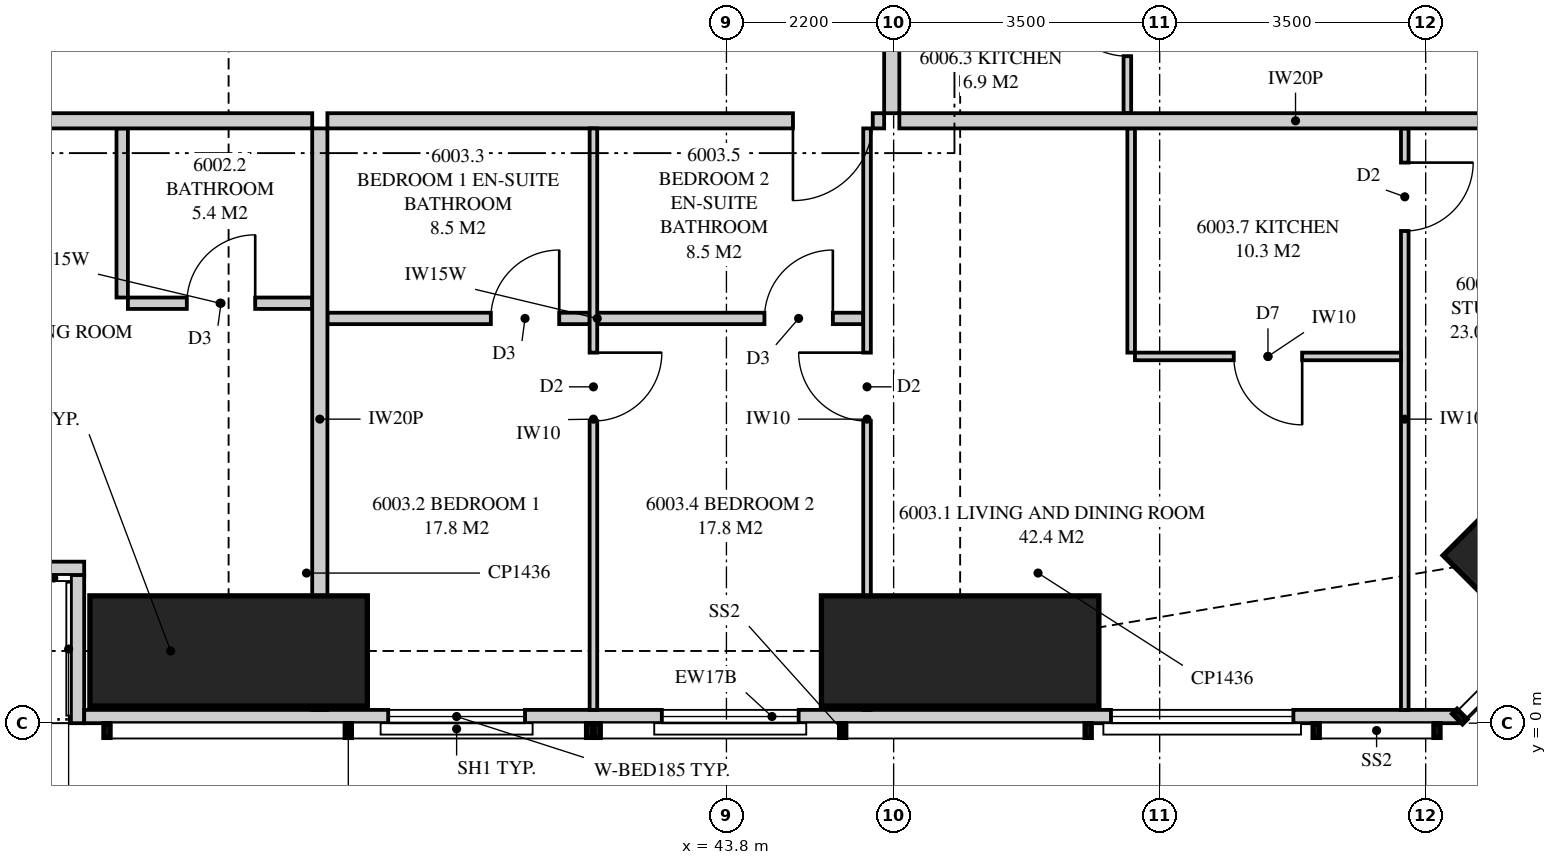
"""IFC4 building model, lengths in metres.
Left out: names, types, materials, properties, quantities, classifications, styles, units other than length and angle.
Written with IfcOpenShell. Run it as: python <this file> out.ifc"""

import sys

from ifc_helpers import new_model, si_unit, direction, frame, frame_2d, origin, origin_2d, place, context, subcontext, project, spatial, polyline, rectangle, hollow_rectangle, outline, extrude, element, fill, save


model = new_model("IFC4")
c1 = context("Model", 3, precision=1e-05, world=origin(), true_north=direction((0.0, 1.0)))
c2 = subcontext(c1, "Body", "Model", "MODEL_VIEW")
j1 = project(units=[si_unit("LENGTHUNIT", "METRE"), si_unit("PLANEANGLEUNIT", "RADIAN")], contexts=[c1])
p1 = place(None, origin())
s1 = spatial("IfcSite", under=j1, at=p1, CompositionType="ELEMENT")
p2 = place(p1, origin())
s2 = spatial("IfcBuilding", under=s1, at=p2, CompositionType="ELEMENT")
p3 = place(p2, frame((0.0, 0.0, 221.45)))
s3 = spatial("IfcBuildingStorey", under=s2, at=p3, CompositionType="ELEMENT", Elevation=221.45)
for number, where, z_axis, x_axis in (
    (1, (37.25, 0.95, 0.0), (0.0, 0.0, 1.0), (0.0, 1.0, 0.0)),
    (2, (46.875, 0.95, 0.0), (0.0, 0.0, 1.0), (0.0, 1.0, 0.0)),
):
    element("IfcColumn", number, at=place(p3, frame(where, z_axis=z_axis, x_axis=x_axis)), inside=s3, PredefinedType="COLUMN", context=c2, shape_type="SweptSolid", body=[
        extrude(rectangle(XDim=1.45, YDim=3.65, at=origin_2d()), origin(), (0.0, 0.0, 1.0), 3.5),
    ])
p4 = place(p3, frame((54.293, 2.207, 0.0), z_axis=(0.0, 0.0, 1.0), x_axis=(-0.707106781187, 0.707106781187, 0.0)))
e3 = element("IfcColumn", 3, at=p4, inside=s3, PredefinedType="COLUMN", context=c2, shape_type="SweptSolid", body=[
    extrude(hollow_rectangle(XDim=1.5, YDim=1.5, WallThickness=0.125, at=origin_2d()), origin(), (0.0, 0.0, 1.0), 3.5),
])
p5 = place(p3, frame((35.35, 0.087, 0.0), z_axis=(0.0, 0.0, 1.0), x_axis=(1.0, 0.0, 0.0)))
e4 = element("IfcWall", 4, at=p5, inside=s3, PredefinedType="SOLIDWALL", context=c2, shape_type="SweptSolid", body=[
    extrude(outline(polyline([(0.0, 0.0), (18.099, 0.0), (18.099, 3.26), (11.74, 3.26), (11.74, 2.3), (11.656, 2.3), (11.656, 3.26), (11.525, 3.26), (11.525, 2.3), (0.0, 2.3), (0.0, 0.0)])), frame((0.0, 0.087, 0.0), z_axis=(0.0, -1.0, 0.0), x_axis=(1.0, 0.0, 0.0)), (0.0, 0.0, 1.0), 0.175),
])
p6 = place(p5, frame((4.0, 0.0, 0.4)))
e5 = element("IfcOpeningElement", 5, at=p6, cuts=e4, PredefinedType="OPENING", context=c2, shape_type="SweptSolid", body=[
    extrude(rectangle(XDim=1.8, YDim=1.85, at=frame_2d((0.9, 0.925))), frame((0.0, 0.097, 0.0), z_axis=(0.0, -1.0, 0.0), x_axis=(1.0, 0.0, 0.0)), (0.0, 0.0, 1.0), 0.195),
])
p7 = place(p5, frame((7.6, 0.0, 0.4)))
e6 = element("IfcOpeningElement", 6, at=p7, cuts=e4, PredefinedType="OPENING", context=c2, shape_type="SweptSolid", body=[
    extrude(rectangle(XDim=1.8, YDim=1.85, at=frame_2d((0.9, 0.925))), frame((0.0, 0.097, 0.0), z_axis=(0.0, -1.0, 0.0), x_axis=(1.0, 0.0, 0.0)), (0.0, 0.0, 1.0), 0.195),
])
p8 = place(p5, frame((13.51, 0.0, 0.4)))
e7 = element("IfcOpeningElement", 7, at=p8, cuts=e4, PredefinedType="OPENING", context=c2, shape_type="SweptSolid", body=[
    extrude(rectangle(XDim=2.4, YDim=1.85, at=frame_2d((1.2, 0.925))), frame((0.0, 0.097, 0.0), z_axis=(0.0, -1.0, 0.0), x_axis=(1.0, 0.0, 0.0)), (0.0, 0.0, 1.0), 0.195),
])
p9 = place(p3, frame((32.3, 2.038, 0.0), z_axis=(0.0, 0.0, 1.0), x_axis=(1.0, 0.0, 0.0)))
e8 = element("IfcWall", 8, at=p9, inside=s3, PredefinedType="SOLIDWALL", context=c2, shape_type="SweptSolid", body=[
    extrude(rectangle(XDim=3.05, YDim=0.175, at=frame_2d((1.525, 0.0))), origin(), (0.0, 0.0, 1.0), 3.26),
])
p10 = place(p9, frame((0.625, 0.0, 0.0)))
e9 = element("IfcOpeningElement", 9, at=p10, cuts=e8, PredefinedType="OPENING", context=c2, shape_type="SweptSolid", body=[
    extrude(rectangle(XDim=1.8, YDim=2.25, at=frame_2d((0.9, 1.125))), frame((0.0, 0.097, 0.0), z_axis=(0.0, -1.0, 0.0), x_axis=(1.0, 0.0, 0.0)), (0.0, 0.0, 1.0), 0.195),
])
p11 = place(p3, frame((35.262, 0.0, 0.0), z_axis=(0.0, 0.0, 1.0), x_axis=(0.0, 1.0, 0.0)))
e10 = element("IfcWall", 10, at=p11, inside=s3, PredefinedType="SOLIDWALL", context=c2, shape_type="SweptSolid", body=[
    extrude(outline(polyline([(0.0, 0.0), (1.95, 0.0), (1.95, 3.26), (1.75, 3.26), (1.75, 2.3), (0.15, 2.3), (0.15, 3.26), (0.0, 3.26), (0.0, 0.0)])), frame((0.0, 0.087, 0.0), z_axis=(0.0, -1.0, 0.0), x_axis=(1.0, 0.0, 0.0)), (0.0, 0.0, 1.0), 0.175),
])
p12 = place(p3, frame((38.45, 0.175, 0.0), z_axis=(0.0, 0.0, 1.0), x_axis=(0.0, 1.0, 0.0)))
e11 = element("IfcWall", 11, at=p12, inside=s3, PredefinedType="PARTITIONING", context=c2, shape_type="SweptSolid", body=[
    extrude(outline(polyline([(0.529, 2.3), (0.0, 2.3), (0.0, 0.0), (0.529, 0.0), (0.529, 0.338), (1.021, 0.338), (1.021, 0.0), (7.65, 0.0), (7.65, 2.66), (1.685, 2.66), (1.685, 2.3), (1.021, 2.3), (1.021, 1.962), (0.529, 1.962), (0.529, 2.3)])), frame((0.0, 0.1, 0.0), z_axis=(0.0, -1.0, 0.0), x_axis=(1.0, 0.0, 0.0)), (0.0, 0.0, 1.0), 0.2),
])
p13 = place(p3, frame((26.5, 7.925, 0.0), z_axis=(0.0, 0.0, 1.0), x_axis=(1.0, 0.0, 0.0)))
e12 = element("IfcWall", 12, at=p13, inside=s3, PredefinedType="PARTITIONING", context=c2, shape_type="SweptSolid", body=[
    extrude(outline(polyline([(0.0, 0.0), (11.85, 0.0), (11.85, 3.26), (11.85, 2.66), (9.44, 2.66), (9.44, 3.26), (2.435, 3.26), (2.435, 2.66), (0.0, 2.66), (0.0, 3.26), (0.0, 0.0)])), frame((0.0, 0.1, 0.0), z_axis=(0.0, -1.0, 0.0), x_axis=(1.0, 0.0, 0.0)), (0.0, 0.0, 1.0), 0.2),
])
p14 = place(p13, frame((5.425, 0.0, 0.0)))
e13 = element("IfcOpeningElement", 13, at=p14, cuts=e12, PredefinedType="OPENING", context=c2, shape_type="SweptSolid", body=[
    extrude(rectangle(XDim=1.05, YDim=2.2, at=frame_2d((0.525, 1.1))), frame((0.0, 0.11, 0.0), z_axis=(0.0, -1.0, 0.0), x_axis=(1.0, 0.0, 0.0)), (0.0, 0.0, 1.0), 0.22),
])
p15 = place(p3, frame((35.925, 5.525, 0.0), z_axis=(0.0, 0.0, 1.0), x_axis=(1.0, 0.0, 0.0)))
e14 = element("IfcWall", 14, at=p15, inside=s3, PredefinedType="PLUMBINGWALL", context=c2, shape_type="SweptSolid", body=[
    extrude(outline(polyline([(0.0, 0.0), (2.425, 0.0), (2.425, 3.26), (2.425, 2.66), (0.04, 2.66), (0.04, 3.26), (0.0, 3.26), (0.0, 0.0)])), frame((0.0, 0.075, 0.0), z_axis=(0.0, -1.0, 0.0), x_axis=(1.0, 0.0, 0.0)), (0.0, 0.0, 1.0), 0.15),
])
p16 = place(p15, frame((0.775, 0.0, 0.0)))
e15 = element("IfcOpeningElement", 15, at=p16, cuts=e14, PredefinedType="OPENING", context=c2, shape_type="SweptSolid", body=[
    extrude(rectangle(XDim=0.9, YDim=2.1, at=frame_2d((0.45, 1.05))), frame((0.0, 0.085, 0.0), z_axis=(0.0, -1.0, 0.0), x_axis=(1.0, 0.0, 0.0)), (0.0, 0.0, 1.0), 0.17),
])
p17 = place(p3, frame((35.85, 5.6, 0.0), z_axis=(0.0, 0.0, 1.0), x_axis=(0.0, 1.0, 0.0)))
e16 = element("IfcWall", 16, at=p17, inside=s3, PredefinedType="PLUMBINGWALL", context=c2, shape_type="SweptSolid", body=[
    extrude(rectangle(XDim=2.225, YDim=0.15, at=frame_2d((1.112, 0.0))), origin(), (0.0, 0.0, 1.0), 3.26),
])
p18 = place(p3, frame((38.55, 7.925, 0.0), z_axis=(0.0, 0.0, 1.0), x_axis=(1.0, 0.0, 0.0)))
e17 = element("IfcWall", 17, at=p18, inside=s3, PredefinedType="PARTITIONING", context=c2, shape_type="SweptSolid", body=[
    extrude(outline(polyline([(0.0, 0.0), (7.325, 0.0), (7.325, 3.26), (7.325, 2.66), (7.015, 2.66), (7.015, 3.26), (0.01, 3.26), (0.01, 2.66), (0.0, 2.66), (0.0, 3.26), (0.0, 0.0)])), frame((0.0, 0.1, 0.0), z_axis=(0.0, -1.0, 0.0), x_axis=(1.0, 0.0, 0.0)), (0.0, 0.0, 1.0), 0.2),
])
p19 = place(p18, frame((6.125, 0.0, 0.0)))
e18 = element("IfcOpeningElement", 18, at=p19, cuts=e17, PredefinedType="OPENING", context=c2, shape_type="SweptSolid", body=[
    extrude(rectangle(XDim=1.05, YDim=2.2, at=frame_2d((0.525, 1.1))), frame((0.0, 0.11, 0.0), z_axis=(0.0, -1.0, 0.0), x_axis=(1.0, 0.0, 0.0)), (0.0, 0.0, 1.0), 0.22),
])
p20 = place(p3, frame((42.05, 0.175, 0.0), z_axis=(0.0, 0.0, 1.0), x_axis=(0.0, 1.0, 0.0)))
e19 = element("IfcWall", 19, at=p20, inside=s3, PredefinedType="PARTITIONING", context=c2, shape_type="SweptSolid", body=[
    extrude(outline(polyline([(0.0, 0.0), (7.65, 0.0), (7.65, 3.26), (1.635, 3.26), (1.635, 2.3), (0.0, 2.3), (0.0, 3.26), (0.0, 0.0)])), frame((0.0, 0.05, 0.0), z_axis=(0.0, -1.0, 0.0), x_axis=(1.0, 0.0, 0.0)), (0.0, 0.0, 1.0), 0.1),
])
p21 = place(p20, frame((3.8, 0.0, 0.0)))
e20 = element("IfcOpeningElement", 20, at=p21, cuts=e19, PredefinedType="OPENING", context=c2, shape_type="SweptSolid", body=[
    extrude(rectangle(XDim=0.9, YDim=2.1, at=frame_2d((0.45, 1.05))), frame((0.0, 0.06, 0.0), z_axis=(0.0, -1.0, 0.0), x_axis=(1.0, 0.0, 0.0)), (0.0, 0.0, 1.0), 0.12),
])
p22 = place(p3, frame((45.65, 0.175, 0.0), z_axis=(0.0, 0.0, 1.0), x_axis=(0.0, 1.0, 0.0)))
e21 = element("IfcWall", 21, at=p22, inside=s3, PredefinedType="PARTITIONING", context=c2, shape_type="SweptSolid", body=[
    extrude(outline(polyline([(0.529, 2.3), (0.0, 2.3), (0.0, 0.0), (0.529, 0.0), (0.529, 0.252), (1.021, 0.252), (1.021, 0.0), (7.65, 0.0), (7.65, 2.66), (1.635, 2.66), (1.635, 2.3), (1.021, 2.3), (1.021, 2.048), (0.529, 2.048), (0.529, 2.3)])), frame((0.0, 0.05, 0.0), z_axis=(0.0, -1.0, 0.0), x_axis=(1.0, 0.0, 0.0)), (0.0, 0.0, 1.0), 0.1),
])
p23 = place(p22, frame((3.8, 0.0, 0.0)))
e22 = element("IfcOpeningElement", 22, at=p23, cuts=e21, PredefinedType="OPENING", context=c2, shape_type="SweptSolid", body=[
    extrude(rectangle(XDim=0.9, YDim=2.1, at=frame_2d((0.45, 1.05))), frame((0.0, 0.06, 0.0), z_axis=(0.0, -1.0, 0.0), x_axis=(1.0, 0.0, 0.0)), (0.0, 0.0, 1.0), 0.12),
])
p24 = place(p3, frame((38.55, 5.325, 0.0), z_axis=(0.0, 0.0, 1.0), x_axis=(1.0, 0.0, 0.0)))
e23 = element("IfcWall", 23, at=p24, inside=s3, PredefinedType="PLUMBINGWALL", context=c2, shape_type="SweptSolid", body=[
    extrude(rectangle(XDim=3.45, YDim=0.15, at=frame_2d((1.725, 0.0))), origin(), (0.0, 0.0, 1.0), 3.26),
])
p25 = place(p24, frame((2.15, 0.0, 0.0)))
e24 = element("IfcOpeningElement", 24, at=p25, cuts=e23, PredefinedType="OPENING", context=c2, shape_type="SweptSolid", body=[
    extrude(rectangle(XDim=0.9, YDim=2.1, at=frame_2d((0.45, 1.05))), frame((0.0, 0.085, 0.0), z_axis=(0.0, -1.0, 0.0), x_axis=(1.0, 0.0, 0.0)), (0.0, 0.0, 1.0), 0.17),
])
p26 = place(p3, frame((42.1, 5.325, 0.0), z_axis=(0.0, 0.0, 1.0), x_axis=(1.0, 0.0, 0.0)))
e25 = element("IfcWall", 25, at=p26, inside=s3, PredefinedType="PLUMBINGWALL", context=c2, shape_type="SweptSolid", body=[
    extrude(outline(polyline([(0.0, 0.0), (3.5, 0.0), (3.5, 3.26), (3.5, 2.66), (3.49, 2.66), (3.49, 3.26), (0.0, 3.26), (0.0, 0.0)])), frame((0.0, 0.075, 0.0), z_axis=(0.0, -1.0, 0.0), x_axis=(1.0, 0.0, 0.0)), (0.0, 0.0, 1.0), 0.15),
])
p27 = place(p26, frame((2.2, 0.0, 0.0)))
e26 = element("IfcOpeningElement", 26, at=p27, cuts=e25, PredefinedType="OPENING", context=c2, shape_type="SweptSolid", body=[
    extrude(rectangle(XDim=0.9, YDim=2.1, at=frame_2d((0.45, 1.05))), frame((0.0, 0.085, 0.0), z_axis=(0.0, -1.0, 0.0), x_axis=(1.0, 0.0, 0.0)), (0.0, 0.0, 1.0), 0.17),
])
p28 = place(p3, frame((52.725, 0.175, 0.0), z_axis=(0.0, 0.0, 1.0), x_axis=(0.0, 1.0, 0.0)))
e27 = element("IfcWall", 27, at=p28, inside=s3, PredefinedType="PARTITIONING", context=c2, shape_type="SweptSolid", body=[
    extrude(outline(polyline([(0.0, 0.0), (7.65, 0.0), (7.65, 3.26), (2.639, 3.26), (2.639, 2.3), (0.894, 2.3), (0.894, 3.26), (0.0, 3.26), (0.0, 0.0)])), frame((0.0, 0.05, 0.0), z_axis=(0.0, -1.0, 0.0), x_axis=(1.0, 0.0, 0.0)), (0.0, 0.0, 1.0), 0.1),
])
p29 = place(p28, frame((6.3, 0.0, 0.0)))
e28 = element("IfcOpeningElement", 28, at=p29, cuts=e27, PredefinedType="OPENING", context=c2, shape_type="SweptSolid", body=[
    extrude(rectangle(XDim=0.9, YDim=2.1, at=frame_2d((0.45, 1.05))), frame((0.0, 0.06, 0.0), z_axis=(0.0, -1.0, 0.0), x_axis=(1.0, 0.0, 0.0)), (0.0, 0.0, 1.0), 0.12),
])
p30 = place(p3, frame((49.175, 4.825, 0.0), z_axis=(0.0, 0.0, 1.0), x_axis=(1.0, 0.0, 0.0)))
e29 = element("IfcWall", 29, at=p30, inside=s3, PredefinedType="PARTITIONING", context=c2, shape_type="SweptSolid", body=[
    extrude(rectangle(XDim=3.5, YDim=0.1, at=frame_2d((1.75, 0.0))), origin(), (0.0, 0.0, 1.0), 3.26),
])
p31 = place(p30, frame((1.3, 0.0, 0.0)))
e30 = element("IfcOpeningElement", 30, at=p31, cuts=e29, PredefinedType="OPENING", context=c2, shape_type="SweptSolid", body=[
    extrude(rectangle(XDim=0.9, YDim=2.1, at=frame_2d((0.45, 1.05))), frame((0.0, 0.06, 0.0), z_axis=(0.0, -1.0, 0.0), x_axis=(1.0, 0.0, 0.0)), (0.0, 0.0, 1.0), 0.12),
])
p32 = place(p3, frame((49.125, 4.875, 0.0), z_axis=(0.0, 0.0, 1.0), x_axis=(0.0, 1.0, 0.0)))
e31 = element("IfcWall", 31, at=p32, inside=s3, PredefinedType="PARTITIONING", context=c2, shape_type="SweptSolid", body=[
    extrude(rectangle(XDim=2.95, YDim=0.1, at=frame_2d((1.475, 0.0))), origin(), (0.0, 0.0, 1.0), 3.26),
])
p33 = place(p3, frame((46.075, 7.925, 0.0), z_axis=(0.0, 0.0, 1.0), x_axis=(1.0, 0.0, 0.0)))
e32 = element("IfcWall", 32, at=p33, inside=s3, PredefinedType="PARTITIONING", context=c2, shape_type="SweptSolid", body=[
    extrude(outline(polyline([(0.0, 0.0), (10.425, 0.0), (10.425, 3.26), (9.8, 3.26), (9.8, 2.3), (7.968, 2.3), (7.968, 3.26), (2.11, 3.26), (2.11, 2.66), (0.0, 2.66), (0.0, 3.26), (0.0, 0.0)])), frame((0.0, 0.1, 0.0), z_axis=(0.0, -1.0, 0.0), x_axis=(1.0, 0.0, 0.0)), (0.0, 0.0, 1.0), 0.2),
])
p34 = place(p3, frame((45.975, 8.025, 0.0), z_axis=(0.0, 0.0, 1.0), x_axis=(0.0, 1.0, 0.0)))
e33 = element("IfcWall", 33, at=p34, inside=s3, PredefinedType="PARTITIONING", context=c2, shape_type="SweptSolid", body=[
    extrude(outline(polyline([(0.0, 0.0), (6.025, 0.0), (6.025, 3.26), (6.025, 2.66), (5.085, 2.66), (0.0, 2.66), (0.0, 3.26), (0.0, 0.0)])), frame((0.0, 0.1, 0.0), z_axis=(0.0, -1.0, 0.0), x_axis=(1.0, 0.0, 0.0)), (0.0, 0.0, 1.0), 0.2),
])
p35 = place(p34, frame((2.512, 0.0, 0.0)))
e34 = element("IfcOpeningElement", 34, at=p35, cuts=e33, PredefinedType="OPENING", context=c2, shape_type="SweptSolid", body=[
    extrude(rectangle(XDim=1.05, YDim=2.2, at=frame_2d((0.525, 1.1))), frame((0.0, 0.11, 0.0), z_axis=(0.0, -1.0, 0.0), x_axis=(1.0, 0.0, 0.0)), (0.0, 0.0, 1.0), 0.22),
])
p36 = place(p3, frame((49.075, 8.025, 0.0), z_axis=(0.0, 0.0, 1.0), x_axis=(0.0, 1.0, 0.0)))
e35 = element("IfcWall", 35, at=p36, inside=s3, PredefinedType="PARTITIONING", context=c2, shape_type="SweptSolid", body=[
    extrude(rectangle(XDim=2.35, YDim=0.1, at=frame_2d((1.175, 0.0))), origin(), (0.0, 0.0, 1.0), 3.26),
])
p37 = place(p36, frame((0.75, 0.0, 0.0)))
e36 = element("IfcOpeningElement", 36, at=p37, cuts=e35, PredefinedType="OPENING", context=c2, shape_type="SweptSolid", body=[
    extrude(rectangle(XDim=0.9, YDim=2.1, at=frame_2d((0.45, 1.05))), frame((0.0, 0.06, 0.0), z_axis=(0.0, -1.0, 0.0), x_axis=(1.0, 0.0, 0.0)), (0.0, 0.0, 1.0), 0.12),
])
p38 = place(p6, origin())
e37 = element("IfcWindow", 37, at=p38, inside=s3, PartitioningType="SINGLE_PANEL", PredefinedType="WINDOW", context=c2, shape_type="SweptSolid", body=[
    extrude(rectangle(XDim=1.8, YDim=1.85, at=frame_2d((0.9, 0.925))), frame((0.0, 0.03, 0.0), z_axis=(0.0, -1.0, 0.0), x_axis=(1.0, 0.0, 0.0)), (0.0, 0.0, 1.0), 0.06),
])
fill(e5, e37)
p39 = place(p7, origin())
e38 = element("IfcWindow", 38, at=p39, inside=s3, PartitioningType="SINGLE_PANEL", PredefinedType="WINDOW", context=c2, shape_type="SweptSolid", body=[
    extrude(rectangle(XDim=1.8, YDim=1.85, at=frame_2d((0.9, 0.925))), frame((0.0, 0.03, 0.0), z_axis=(0.0, -1.0, 0.0), x_axis=(1.0, 0.0, 0.0)), (0.0, 0.0, 1.0), 0.06),
])
fill(e6, e38)
p40 = place(p8, origin())
e39 = element("IfcWindow", 39, at=p40, inside=s3, PartitioningType="SINGLE_PANEL", PredefinedType="WINDOW", context=c2, shape_type="SweptSolid", body=[
    extrude(rectangle(XDim=2.4, YDim=1.85, at=frame_2d((1.2, 0.925))), frame((0.0, 0.03, 0.0), z_axis=(0.0, -1.0, 0.0), x_axis=(1.0, 0.0, 0.0)), (0.0, 0.0, 1.0), 0.06),
])
fill(e7, e39)
p41 = place(p16, origin())
e40 = element("IfcDoor", 40, at=p41, inside=s3, OperationType="SINGLE_SWING_RIGHT", PredefinedType="DOOR", context=c2, shape_type="SweptSolid", body=[
    extrude(rectangle(XDim=0.9, YDim=2.1, at=frame_2d((0.45, 1.05))), frame((0.0, 0.025, 0.0), z_axis=(0.0, -1.0, 0.0), x_axis=(1.0, 0.0, 0.0)), (0.0, 0.0, 1.0), 0.05),
])
fill(e15, e40)
p42 = place(p19, frame((1.05, 0.0, 0.0), z_axis=(0.0, 0.0, 1.0), x_axis=(-1.0, 0.0, 0.0)))
e41 = element("IfcDoor", 41, at=p42, inside=s3, OperationType="SINGLE_SWING_RIGHT", PredefinedType="DOOR", context=c2, shape_type="SweptSolid", body=[
    extrude(rectangle(XDim=1.05, YDim=2.2, at=frame_2d((0.525, 1.1))), frame((0.0, 0.025, 0.0), z_axis=(0.0, -1.0, 0.0), x_axis=(1.0, 0.0, 0.0)), (0.0, 0.0, 1.0), 0.05),
])
fill(e18, e41)
p43 = place(p21, frame((0.9, 0.0, 0.0), z_axis=(0.0, 0.0, 1.0), x_axis=(-1.0, 0.0, 0.0)))
e42 = element("IfcDoor", 42, at=p43, inside=s3, OperationType="SINGLE_SWING_LEFT", PredefinedType="DOOR", context=c2, shape_type="SweptSolid", body=[
    extrude(rectangle(XDim=0.9, YDim=2.1, at=frame_2d((0.45, 1.05))), frame((0.0, 0.025, 0.0), z_axis=(0.0, -1.0, 0.0), x_axis=(1.0, 0.0, 0.0)), (0.0, 0.0, 1.0), 0.05),
])
fill(e20, e42)
p44 = place(p25, origin())
e43 = element("IfcDoor", 43, at=p44, inside=s3, OperationType="SINGLE_SWING_RIGHT", PredefinedType="DOOR", context=c2, shape_type="SweptSolid", body=[
    extrude(rectangle(XDim=0.9, YDim=2.1, at=frame_2d((0.45, 1.05))), frame((0.0, 0.025, 0.0), z_axis=(0.0, -1.0, 0.0), x_axis=(1.0, 0.0, 0.0)), (0.0, 0.0, 1.0), 0.05),
])
fill(e24, e43)
p45 = place(p23, origin())
e44 = element("IfcDoor", 44, at=p45, inside=s3, OperationType="SINGLE_SWING_RIGHT", PredefinedType="DOOR", context=c2, shape_type="SweptSolid", body=[
    extrude(rectangle(XDim=0.9, YDim=2.1, at=frame_2d((0.45, 1.05))), frame((0.0, 0.025, 0.0), z_axis=(0.0, -1.0, 0.0), x_axis=(1.0, 0.0, 0.0)), (0.0, 0.0, 1.0), 0.05),
])
fill(e22, e44)
p46 = place(p27, origin())
e45 = element("IfcDoor", 45, at=p46, inside=s3, OperationType="SINGLE_SWING_RIGHT", PredefinedType="DOOR", context=c2, shape_type="SweptSolid", body=[
    extrude(rectangle(XDim=0.9, YDim=2.1, at=frame_2d((0.45, 1.05))), frame((0.0, 0.025, 0.0), z_axis=(0.0, -1.0, 0.0), x_axis=(1.0, 0.0, 0.0)), (0.0, 0.0, 1.0), 0.05),
])
fill(e26, e45)
p47 = place(p29, frame((0.9, 0.0, 0.0), z_axis=(0.0, 0.0, 1.0), x_axis=(-1.0, 0.0, 0.0)))
e46 = element("IfcDoor", 46, at=p47, inside=s3, OperationType="SINGLE_SWING_LEFT", PredefinedType="DOOR", context=c2, shape_type="SweptSolid", body=[
    extrude(rectangle(XDim=0.9, YDim=2.1, at=frame_2d((0.45, 1.05))), frame((0.0, 0.025, 0.0), z_axis=(0.0, -1.0, 0.0), x_axis=(1.0, 0.0, 0.0)), (0.0, 0.0, 1.0), 0.05),
])
fill(e28, e46)
p48 = place(p31, frame((0.9, 0.0, 0.0), z_axis=(0.0, 0.0, 1.0), x_axis=(-1.0, 0.0, 0.0)))
e47 = element("IfcDoor", 47, at=p48, inside=s3, OperationType="SINGLE_SWING_LEFT", PredefinedType="DOOR", context=c2, shape_type="SweptSolid", body=[
    extrude(rectangle(XDim=0.9, YDim=2.1, at=frame_2d((0.45, 1.05))), frame((0.0, 0.025, 0.0), z_axis=(0.0, -1.0, 0.0), x_axis=(1.0, 0.0, 0.0)), (0.0, 0.0, 1.0), 0.05),
])
fill(e30, e47)
p49 = place(p37, origin())
e48 = element("IfcDoor", 48, at=p49, inside=s3, OperationType="SINGLE_SWING_RIGHT", PredefinedType="DOOR", context=c2, shape_type="SweptSolid", body=[
    extrude(rectangle(XDim=0.9, YDim=2.1, at=frame_2d((0.45, 1.05))), frame((0.0, 0.025, 0.0), z_axis=(0.0, -1.0, 0.0), x_axis=(1.0, 0.0, 0.0)), (0.0, 0.0, 1.0), 0.05),
])
fill(e36, e48)
save(model, sys.argv[1])
